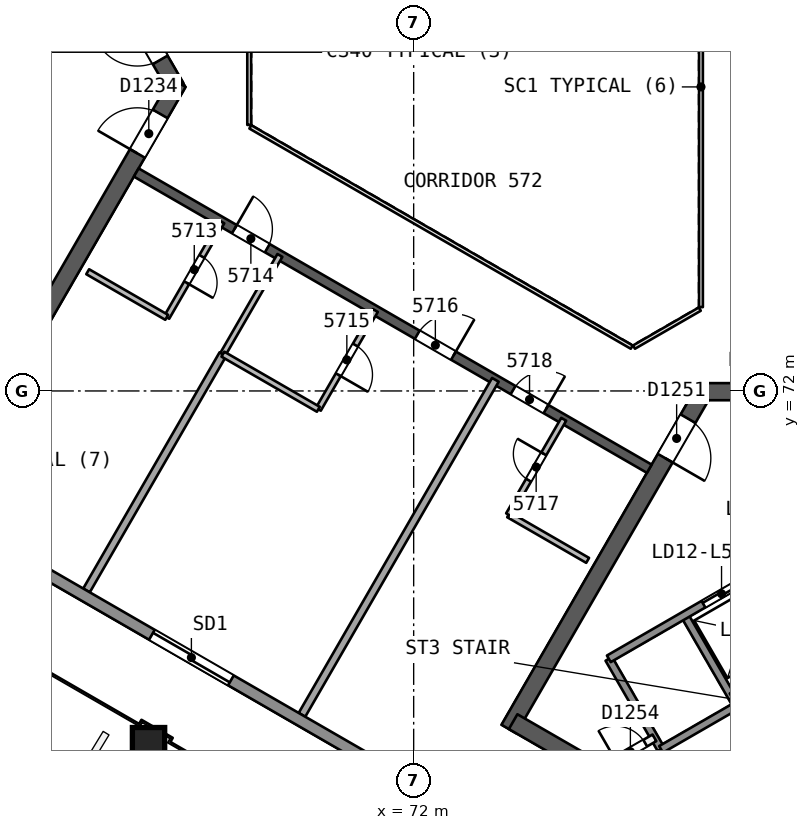
"""IFC4 building model, lengths in metres.
Left out: names, types, materials, properties, quantities, classifications, styles, units other than length and angle.
Written with IfcOpenShell. Run it as: python <this file> out.ifc"""

import sys

from ifc_helpers import new_model, si_unit, direction, frame, frame_2d, origin, origin_2d, place, context, subcontext, project, spatial, rectangle, extrude, element, fill, save


model = new_model("IFC4")
c1 = context("Model", 3, precision=1e-05, world=origin(), true_north=direction((0.0, 1.0)))
c2 = subcontext(c1, "Body", "Model", "MODEL_VIEW")
j1 = project(units=[si_unit("LENGTHUNIT", "METRE"), si_unit("PLANEANGLEUNIT", "RADIAN")], contexts=[c1])
p1 = place(None, origin())
s1 = spatial("IfcSite", under=j1, at=p1, CompositionType="ELEMENT")
p2 = place(p1, origin())
s2 = spatial("IfcBuilding", under=s1, at=p2, CompositionType="ELEMENT")
p3 = place(p2, frame((0.0, 0.0, 231.7)))
s3 = spatial("IfcBuildingStorey", under=s2, at=p3, CompositionType="ELEMENT", Elevation=231.7)
p4 = place(p3, frame((65.74, 80.0, 0.0), z_axis=(0.0, 0.0, 1.0), x_axis=(-0.499991857942, 0.866030104553, 0.0)))
e1 = element("IfcWall", 1, at=p4, inside=s3, PredefinedType="SHEAR", context=c2, shape_type="SweptSolid", body=[
    extrude(rectangle(XDim=10.25, YDim=0.45, at=frame_2d((5.125, 0.0))), origin(), (0.0, 0.0, 1.0), 3.7),
])
p5 = place(p4, frame((0.82, 0.0, 0.0)))
e2 = element("IfcOpeningElement", 2, at=p5, cuts=e1, PredefinedType="OPENING", context=c2, shape_type="SweptSolid", body=[
    extrude(rectangle(XDim=1.2, YDim=2.1, at=frame_2d((0.6, 1.05))), frame((0.0, 0.235, 0.0), z_axis=(0.0, -1.0, 0.0), x_axis=(1.0, 0.0, 0.0)), (0.0, 0.0, 1.0), 0.471),
])
p6 = place(p3, frame((60.728, 71.318, 0.0), z_axis=(0.0, 0.0, 1.0), x_axis=(0.500012416173, 0.866018235185, 0.0)))
e3 = element("IfcWall", 3, at=p6, inside=s3, PredefinedType="SHEAR", context=c2, shape_type="SweptSolid", body=[
    extrude(rectangle(XDim=10.155, YDim=0.45, at=frame_2d((5.078, 0.0))), origin(), (0.0, 0.0, 1.0), 3.7),
])
p7 = place(p6, frame((8.005, 0.0, 0.0)))
e4 = element("IfcOpeningElement", 4, at=p7, cuts=e3, PredefinedType="OPENING", context=c2, shape_type="SweptSolid", body=[
    extrude(rectangle(XDim=1.2, YDim=2.1, at=frame_2d((0.6, 1.05))), frame((0.0, 0.235, 0.0), z_axis=(0.0, -1.0, 0.0), x_axis=(1.0, 0.0, 0.0)), (0.0, 0.0, 1.0), 0.471),
])
p8 = place(p3, frame((79.63, 71.981, 0.0), z_axis=(0.0, 0.0, 1.0), x_axis=(-0.500002171595, -0.86602415001, 0.0)))
e5 = element("IfcWall", 5, at=p8, inside=s3, PredefinedType="SHEAR", context=c2, shape_type="SweptSolid", body=[
    extrude(rectangle(XDim=10.25, YDim=0.45, at=frame_2d((5.125, 0.0))), origin(), (0.0, 0.0, 1.0), 3.7),
])
p9 = place(p8, frame((0.82, 0.0, 0.0)))
e6 = element("IfcOpeningElement", 6, at=p9, cuts=e5, PredefinedType="OPENING", context=c2, shape_type="SweptSolid", body=[
    extrude(rectangle(XDim=1.2, YDim=2.1, at=frame_2d((0.6, 1.05))), frame((0.0, 0.235, 0.0), z_axis=(0.0, -1.0, 0.0), x_axis=(1.0, 0.0, 0.0)), (0.0, 0.0, 1.0), 0.471),
])
p10 = place(p3, frame((74.617, 63.299, 0.0), z_axis=(0.0, 0.0, 1.0), x_axis=(0.86602594008, -0.499999071108, 0.0)))
e7 = element("IfcWall", 7, at=p10, inside=s3, PredefinedType="SHEAR", context=c2, shape_type="SweptSolid", body=[
    extrude(rectangle(XDim=14.108, YDim=0.45, at=frame_2d((7.054, 0.0))), origin(), (0.0, 0.0, 1.0), 3.7),
])
p11 = place(p3, frame((89.655, 71.981, 0.0), z_axis=(0.0, 0.0, 1.0), x_axis=(-1.0, 0.0, 0.0)))
e8 = element("IfcWall", 8, at=p11, inside=s3, PredefinedType="SHEAR", context=c2, shape_type="SweptSolid", body=[
    extrude(rectangle(XDim=10.155, YDim=0.45, at=frame_2d((5.078, 0.0))), origin(), (0.0, 0.0, 1.0), 3.7),
])
p12 = place(p11, frame((8.005, 0.0, 0.0)))
e9 = element("IfcOpeningElement", 9, at=p12, cuts=e8, PredefinedType="OPENING", context=c2, shape_type="SweptSolid", body=[
    extrude(rectangle(XDim=1.2, YDim=2.1, at=frame_2d((0.6, 1.05))), frame((0.0, 0.235, 0.0), z_axis=(0.0, -1.0, 0.0), x_axis=(1.0, 0.0, 0.0)), (0.0, 0.0, 1.0), 0.471),
])
p13 = place(p3, frame((64.7, 77.748, 0.0), z_axis=(0.0, 0.0, 1.0), x_axis=(0.866026492143, -0.499998114903, 0.0)))
e10 = element("IfcWall", 10, at=p13, inside=s3, PredefinedType="SHEAR", context=c2, shape_type="SweptSolid", body=[
    extrude(rectangle(XDim=15.588, YDim=0.25, at=frame_2d((7.794, 0.0))), origin(), (0.0, 0.0, 1.0), 3.3),
])
p14 = place(p13, frame((2.982, 0.0, 0.0)))
e11 = element("IfcOpeningElement", 11, at=p14, cuts=e10, PredefinedType="OPENING", context=c2, shape_type="SweptSolid", body=[
    extrude(rectangle(XDim=1.0, YDim=2.1, at=frame_2d((0.5, 1.05))), frame((0.0, 0.135, 0.0), z_axis=(0.0, -1.0, 0.0), x_axis=(1.0, 0.0, 0.0)), (0.0, 0.0, 1.0), 0.271),
])
p15 = place(p13, frame((8.538, 0.0, 0.0)))
e12 = element("IfcOpeningElement", 12, at=p15, cuts=e10, PredefinedType="OPENING", context=c2, shape_type="SweptSolid", body=[
    extrude(rectangle(XDim=1.1, YDim=2.1, at=frame_2d((0.55, 1.05))), frame((0.0, 0.135, 0.0), z_axis=(0.0, -1.0, 0.0), x_axis=(1.0, 0.0, 0.0)), (0.0, 0.0, 1.0), 0.271),
])
p16 = place(p13, frame((11.45, 0.0, 0.0)))
e13 = element("IfcOpeningElement", 13, at=p16, cuts=e10, PredefinedType="OPENING", context=c2, shape_type="SweptSolid", body=[
    extrude(rectangle(XDim=1.0, YDim=2.1, at=frame_2d((0.5, 1.05))), frame((0.0, 0.135, 0.0), z_axis=(0.0, -1.0, 0.0), x_axis=(1.0, 0.0, 0.0)), (0.0, 0.0, 1.0), 0.271),
])
p17 = place(p3, frame((65.011, 62.699, 0.0), z_axis=(0.010093620709, 0.017482414954, 0.999796221231), x_axis=(-0.499912926478, -0.865840372083, 0.020187025823)))
e14 = element("IfcColumn", 14, at=p17, inside=s3, PredefinedType="COLUMN", context=c2, shape_type="SweptSolid", body=[
    extrude(rectangle(XDim=0.85, YDim=0.85, at=origin_2d()), origin(), (0.0, 0.0, 1.0), 3.701),
])
p18 = place(p3, frame((66.952, 76.448, 0.0), z_axis=(0.0, 0.0, 1.0), x_axis=(-0.499987231761, -0.866032775405, 0.0)))
e15 = element("IfcWall", 15, at=p18, inside=s3, PredefinedType="PARTITIONING", context=c2, shape_type="SweptSolid", body=[
    extrude(rectangle(XDim=2.9, YDim=0.15, at=frame_2d((1.45, 0.0))), origin(), (0.0, 0.0, 1.0), 3.3),
])
p19 = place(p18, frame((1.05, 0.0, 0.0)))
e16 = element("IfcOpeningElement", 16, at=p19, cuts=e15, PredefinedType="OPENING", context=c2, shape_type="SweptSolid", body=[
    extrude(rectangle(XDim=0.8, YDim=2.1, at=frame_2d((0.4, 1.05))), frame((0.0, 0.085, 0.0), z_axis=(0.0, -1.0, 0.0), x_axis=(1.0, 0.0, 0.0)), (0.0, 0.0, 1.0), 0.171),
])
p20 = place(p3, frame((65.502, 73.937, 0.0), z_axis=(0.0, 0.0, 1.0), x_axis=(-0.865994240961, 0.500053971709, 0.0)))
e17 = element("IfcWall", 17, at=p20, inside=s3, PredefinedType="PARTITIONING", context=c2, shape_type="SweptSolid", body=[
    extrude(rectangle(XDim=2.401, YDim=0.15, at=frame_2d((1.201, 0.0))), origin(), (0.0, 0.0, 1.0), 3.3),
])
p21 = place(p3, frame((63.391, 66.751, 0.0), z_axis=(0.0, 0.0, 1.0), x_axis=(0.499994271117, 0.866028711331, 0.0)))
e18 = element("IfcWall", 18, at=p21, inside=s3, PredefinedType="PARTITIONING", context=c2, shape_type="SweptSolid", body=[
    extrude(rectangle(XDim=7.179, YDim=0.2, at=frame_2d((3.589, 0.0))), origin(), (0.0, 0.0, 1.0), 3.3),
])
p22 = place(p3, frame((66.98, 72.968, 0.0), z_axis=(0.0, 0.0, 1.0), x_axis=(0.499990139034, 0.866031096941, 0.0)))
e19 = element("IfcWall", 19, at=p22, inside=s3, PredefinedType="PARTITIONING", context=c2, shape_type="SweptSolid", body=[
    extrude(rectangle(XDim=3.0, YDim=0.15, at=frame_2d((1.5, 0.0))), origin(), (0.0, 0.0, 1.0), 3.3),
])
p23 = place(p3, frame((70.991, 74.116, 0.0), z_axis=(0.0, 0.0, 1.0), x_axis=(-0.499990139034, -0.866031096941, 0.0)))
e20 = element("IfcWall", 20, at=p23, inside=s3, PredefinedType="PARTITIONING", context=c2, shape_type="SweptSolid", body=[
    extrude(rectangle(XDim=3.0, YDim=0.15, at=frame_2d((1.5, 0.0))), origin(), (0.0, 0.0, 1.0), 3.3),
])
p24 = place(p23, frame((1.05, 0.0, 0.0)))
e21 = element("IfcOpeningElement", 21, at=p24, cuts=e20, PredefinedType="OPENING", context=c2, shape_type="SweptSolid", body=[
    extrude(rectangle(XDim=0.9, YDim=2.1, at=frame_2d((0.45, 1.05))), frame((0.0, 0.085, 0.0), z_axis=(0.0, -1.0, 0.0), x_axis=(1.0, 0.0, 0.0)), (0.0, 0.0, 1.0), 0.171),
])
p25 = place(p3, frame((69.491, 71.518, 0.0), z_axis=(0.0, 0.0, 1.0), x_axis=(-0.866032775405, 0.499987231761, 0.0)))
e22 = element("IfcWall", 22, at=p25, inside=s3, PredefinedType="PARTITIONING", context=c2, shape_type="SweptSolid", body=[
    extrude(rectangle(XDim=2.9, YDim=0.15, at=frame_2d((1.45, 0.0))), origin(), (0.0, 0.0, 1.0), 3.3),
])
p26 = place(p3, frame((69.061, 63.477, 0.0), z_axis=(0.0, 0.0, 1.0), x_axis=(0.499993053251, 0.866029414455, 0.0)))
e23 = element("IfcWall", 23, at=p26, inside=s3, PredefinedType="PARTITIONING", context=c2, shape_type="SweptSolid", body=[
    extrude(rectangle(XDim=10.179, YDim=0.2, at=frame_2d((5.089, 0.0))), origin(), (0.0, 0.0, 1.0), 3.3),
])
p27 = place(p3, frame((76.578, 67.542, 0.0), z_axis=(0.0, 0.0, 1.0), x_axis=(-0.866038271014, 0.499977712642, 0.0)))
e24 = element("IfcWall", 24, at=p27, inside=s3, PredefinedType="PARTITIONING", context=c2, shape_type="SweptSolid", body=[
    extrude(rectangle(XDim=2.401, YDim=0.15, at=frame_2d((1.2, 0.0))), origin(), (0.0, 0.0, 1.0), 3.3),
])
p28 = place(p3, frame((74.498, 68.743, 0.0), z_axis=(0.0, 0.0, 1.0), x_axis=(0.499987231761, 0.866032775405, 0.0)))
e25 = element("IfcWall", 25, at=p28, inside=s3, PredefinedType="PARTITIONING", context=c2, shape_type="SweptSolid", body=[
    extrude(rectangle(XDim=2.9, YDim=0.15, at=frame_2d((1.45, 0.0))), origin(), (0.0, 0.0, 1.0), 3.3),
])
p29 = place(p28, frame((1.05, 0.0, 0.0)))
e26 = element("IfcOpeningElement", 26, at=p29, cuts=e25, PredefinedType="OPENING", context=c2, shape_type="SweptSolid", body=[
    extrude(rectangle(XDim=0.8, YDim=2.1, at=frame_2d((0.4, 1.05))), frame((0.0, 0.085, 0.0), z_axis=(0.0, -1.0, 0.0), x_axis=(1.0, 0.0, 0.0)), (0.0, 0.0, 1.0), 0.171),
])
p30 = place(p3, frame((87.988, 52.377, 0.0), z_axis=(0.0, 0.0, 1.0), x_axis=(-0.866023992326, 0.500002444709, 0.0)))
e27 = element("IfcWall", 27, at=p30, inside=s3, PredefinedType="SOLIDWALL", context=c2, shape_type="SweptSolid", body=[
    extrude(rectangle(XDim=50.118, YDim=0.3, at=frame_2d((25.059, 0.0))), origin(), (0.0, 0.0, 1.0), 3.3),
])
p31 = place(p30, frame((24.015, 0.0, 0.0)))
e28 = element("IfcOpeningElement", 28, at=p31, cuts=e27, PredefinedType="OPENING", context=c2, shape_type="SweptSolid", body=[
    extrude(rectangle(XDim=2.4, YDim=2.4, at=frame_2d((1.2, 1.2))), frame((0.0, 0.161, 0.0), z_axis=(0.0, -1.0, 0.0), x_axis=(1.0, 0.0, 0.0)), (0.0, 0.0, 1.0), 0.321),
])
p32 = place(p30, frame((38.146, 0.0, 0.0)))
e29 = element("IfcOpeningElement", 29, at=p32, cuts=e27, PredefinedType="OPENING", context=c2, shape_type="SweptSolid", body=[
    extrude(rectangle(XDim=2.4, YDim=2.4, at=frame_2d((1.2, 1.2))), frame((0.0, 0.161, 0.0), z_axis=(0.0, -1.0, 0.0), x_axis=(1.0, 0.0, 0.0)), (0.0, 0.0, 1.0), 0.321),
])
p33 = place(p30, frame((9.727, 0.0, 0.0)))
e30 = element("IfcOpeningElement", 30, at=p33, cuts=e27, PredefinedType="OPENING", context=c2, shape_type="SweptSolid", body=[
    extrude(rectangle(XDim=2.4, YDim=2.4, at=frame_2d((1.2, 1.2))), frame((0.0, 0.161, 0.0), z_axis=(0.0, -1.0, 0.0), x_axis=(1.0, 0.0, 0.0)), (0.0, 0.0, 1.0), 0.321),
])
for number, where, z_axis, x_axis in (
    (31, (77.135, 64.952, 0.0), (0.0, 0.0, 1.0), (0.5, -0.866, 0.0)),
    (32, (79.127, 66.102, 0.0), (0.0, 0.0, 1.0), (0.5, -0.866, 0.0)),
):
    element("IfcWall", number, at=place(p3, frame(where, z_axis=z_axis, x_axis=x_axis)), inside=s3, PredefinedType="SOLIDWALL", context=c2, shape_type="SweptSolid", body=[
        extrude(rectangle(XDim=2.75, YDim=0.2, at=frame_2d((1.375, 0.0))), origin(), (0.0, 0.0, 1.0), 3.3),
    ])
p34 = place(p3, frame((77.135, 64.952, 0.0), z_axis=(0.0, 0.0, 1.0), x_axis=(0.866031916153, 0.499988720078, 0.0)))
e33 = element("IfcWall", 33, at=p34, inside=s3, PredefinedType="SOLIDWALL", context=c2, shape_type="SweptSolid", body=[
    extrude(rectangle(XDim=11.35, YDim=0.2, at=frame_2d((5.675, 0.0))), origin(), (0.0, 0.0, 1.0), 3.3),
])
p35 = place(p34, frame((2.875, 0.0, 0.0)))
e34 = element("IfcOpeningElement", 34, at=p35, cuts=e33, PredefinedType="OPENING", context=c2, shape_type="SweptSolid", body=[
    extrude(rectangle(XDim=1.1, YDim=2.1, at=frame_2d((0.55, 1.05))), frame((0.0, 0.11, 0.0), z_axis=(0.0, -1.0, 0.0), x_axis=(1.0, 0.0, 0.0)), (0.0, 0.0, 1.0), 0.221),
])
p36 = place(p34, frame((5.125, 0.0, 0.0)))
e35 = element("IfcOpeningElement", 35, at=p36, cuts=e33, PredefinedType="OPENING", context=c2, shape_type="SweptSolid", body=[
    extrude(rectangle(XDim=1.1, YDim=2.1, at=frame_2d((0.55, 1.05))), frame((0.0, 0.11, 0.0), z_axis=(0.0, -1.0, 0.0), x_axis=(1.0, 0.0, 0.0)), (0.0, 0.0, 1.0), 0.221),
])
p37 = place(p34, frame((7.375, 0.0, 0.0)))
e36 = element("IfcOpeningElement", 36, at=p37, cuts=e33, PredefinedType="OPENING", context=c2, shape_type="SweptSolid", body=[
    extrude(rectangle(XDim=1.1, YDim=2.1, at=frame_2d((0.55, 1.05))), frame((0.0, 0.11, 0.0), z_axis=(0.0, -1.0, 0.0), x_axis=(1.0, 0.0, 0.0)), (0.0, 0.0, 1.0), 0.221),
])
p38 = place(p3, frame((77.07, 62.143, 0.0), z_axis=(0.0, 0.0, 1.0), x_axis=(0.866013036001, 0.500021421018, 0.0)))
e37 = element("IfcWall", 37, at=p38, inside=s3, PredefinedType="PARTITIONING", context=c2, shape_type="SweptSolid", body=[
    extrude(rectangle(XDim=1.461, YDim=0.2, at=frame_2d((0.73, 0.0))), origin(), (0.0, 0.0, 1.0), 3.3),
])
p39 = place(p38, frame((0.281, 0.0, 0.0)))
e38 = element("IfcOpeningElement", 38, at=p39, cuts=e37, PredefinedType="OPENING", context=c2, shape_type="SweptSolid", body=[
    extrude(rectangle(XDim=0.9, YDim=2.1, at=frame_2d((0.45, 1.05))), frame((0.0, 0.11, 0.0), z_axis=(0.0, -1.0, 0.0), x_axis=(1.0, 0.0, 0.0)), (0.0, 0.0, 1.0), 0.221),
])
p40 = place(p3, frame((80.367, 63.954, 0.0), z_axis=(0.0, 0.0, 1.0), x_axis=(0.866026575979, 0.499997969693, 0.0)))
e39 = element("IfcWall", 39, at=p40, inside=s3, PredefinedType="SOLIDWALL", context=c2, shape_type="SweptSolid", body=[
    extrude(rectangle(XDim=6.75, YDim=0.2, at=frame_2d((3.375, 0.0))), origin(), (0.0, 0.0, 1.0), 3.3),
])
p41 = place(p3, frame((78.51, 62.57, 0.0), z_axis=(0.0, 0.0, 1.0), x_axis=(0.866053019151, 0.499952165731, 0.0)))
e40 = element("IfcWall", 40, at=p41, inside=s3, PredefinedType="SOLIDWALL", context=c2, shape_type="SweptSolid", body=[
    extrude(rectangle(XDim=2.3, YDim=0.2, at=frame_2d((1.15, 0.0))), origin(), (0.0, 0.0, 1.0), 3.3),
])
p42 = place(p3, frame((79.56, 74.206, 0.0), z_axis=(0.0, 0.0, 1.0), x_axis=(0.0, 1.0, 0.0)))
e41 = element("IfcWall", 41, at=p42, inside=s3, PredefinedType="PARTITIONING", context=c2, shape_type="SweptSolid", body=[
    extrude(rectangle(XDim=11.588, YDim=0.1, at=frame_2d((5.794, 0.0))), origin(), (0.0, 0.0, 1.0), 3.3),
])
p43 = place(p3, frame((67.672, 81.0, 0.0), z_axis=(0.0, 0.0, 1.0), x_axis=(0.0, -1.0, 0.0)))
e42 = element("IfcWall", 42, at=p43, inside=s3, PredefinedType="PARTITIONING", context=c2, shape_type="SweptSolid", body=[
    extrude(rectangle(XDim=2.0, YDim=0.1, at=frame_2d((1.0, 0.0))), origin(), (0.0, 0.0, 1.0), 3.3),
])
p44 = place(p3, frame((67.702, 78.948, 0.0), z_axis=(0.0, 0.0, 1.0), x_axis=(0.866026658274, -0.499997827154, 0.0)))
e43 = element("IfcWall", 43, at=p44, inside=s3, PredefinedType="PARTITIONING", context=c2, shape_type="SweptSolid", body=[
    extrude(rectangle(XDim=11.588, YDim=0.1, at=frame_2d((5.794, 0.0))), origin(), (0.0, 0.0, 1.0), 3.3),
])
p45 = place(p3, frame((77.798, 73.154, 0.0), z_axis=(0.0, 0.0, 1.0), x_axis=(0.866041268327, 0.499972520799, 0.0)))
e44 = element("IfcWall", 44, at=p45, inside=s3, PredefinedType="PARTITIONING", context=c2, shape_type="SweptSolid", body=[
    extrude(rectangle(XDim=2.0, YDim=0.1, at=frame_2d((1.0, 0.0))), origin(), (0.0, 0.0, 1.0), 3.3),
])
p46 = place(p19, origin())
e45 = element("IfcDoor", 45, at=p46, inside=s3, OperationType="SINGLE_SWING_RIGHT", PredefinedType="NOTDEFINED", context=c2, shape_type="SweptSolid", body=[
    extrude(rectangle(XDim=0.8, YDim=2.1, at=frame_2d((0.4, 1.05))), frame((0.0, 0.025, 0.0), z_axis=(0.0, -1.0, 0.0), x_axis=(1.0, 0.0, 0.0)), (0.0, 0.0, 1.0), 0.05),
])
fill(e16, e45)
p47 = place(p14, origin())
e46 = element("IfcDoor", 46, at=p47, inside=s3, OperationType="SINGLE_SWING_LEFT", PredefinedType="NOTDEFINED", context=c2, shape_type="SweptSolid", body=[
    extrude(rectangle(XDim=1.0, YDim=2.1, at=frame_2d((0.5, 1.05))), frame((0.0, 0.025, 0.0), z_axis=(0.0, -1.0, 0.0), x_axis=(1.0, 0.0, 0.0)), (0.0, 0.0, 1.0), 0.05),
])
fill(e11, e46)
p48 = place(p24, origin())
e47 = element("IfcDoor", 47, at=p48, inside=s3, OperationType="SINGLE_SWING_RIGHT", PredefinedType="NOTDEFINED", context=c2, shape_type="SweptSolid", body=[
    extrude(rectangle(XDim=0.9, YDim=2.1, at=frame_2d((0.45, 1.05))), frame((0.0, 0.025, 0.0), z_axis=(0.0, -1.0, 0.0), x_axis=(1.0, 0.0, 0.0)), (0.0, 0.0, 1.0), 0.05),
])
fill(e21, e47)
p49 = place(p15, origin())
e48 = element("IfcDoor", 48, at=p49, inside=s3, OperationType="SINGLE_SWING_RIGHT", PredefinedType="NOTDEFINED", context=c2, shape_type="SweptSolid", body=[
    extrude(rectangle(XDim=1.1, YDim=2.1, at=frame_2d((0.55, 1.05))), frame((0.0, 0.025, 0.0), z_axis=(0.0, -1.0, 0.0), x_axis=(1.0, 0.0, 0.0)), (0.0, 0.0, 1.0), 0.05),
])
fill(e12, e48)
p50 = place(p29, origin())
e49 = element("IfcDoor", 49, at=p50, inside=s3, OperationType="SINGLE_SWING_RIGHT", PredefinedType="NOTDEFINED", context=c2, shape_type="SweptSolid", body=[
    extrude(rectangle(XDim=0.8, YDim=2.1, at=frame_2d((0.4, 1.05))), frame((0.0, 0.025, 0.0), z_axis=(0.0, -1.0, 0.0), x_axis=(1.0, 0.0, 0.0)), (0.0, 0.0, 1.0), 0.05),
])
fill(e26, e49)
p51 = place(p16, origin())
e50 = element("IfcDoor", 50, at=p51, inside=s3, OperationType="SINGLE_SWING_RIGHT", PredefinedType="NOTDEFINED", context=c2, shape_type="SweptSolid", body=[
    extrude(rectangle(XDim=1.0, YDim=2.1, at=frame_2d((0.5, 1.05))), frame((0.0, 0.025, 0.0), z_axis=(0.0, -1.0, 0.0), x_axis=(1.0, 0.0, 0.0)), (0.0, 0.0, 1.0), 0.05),
])
fill(e13, e50)
p52 = place(p31, origin())
e51 = element("IfcDoor", 51, at=p52, inside=s3, OperationType="SLIDING_TO_LEFT", PredefinedType="NOTDEFINED", context=c2, shape_type="SweptSolid", body=[
    extrude(rectangle(XDim=2.4, YDim=2.4, at=frame_2d((1.2, 1.2))), frame((0.0, 0.025, 0.0), z_axis=(0.0, -1.0, 0.0), x_axis=(1.0, 0.0, 0.0)), (0.0, 0.0, 1.0), 0.05),
])
fill(e28, e51)
p53 = place(p5, origin())
e52 = element("IfcDoor", 52, at=p53, inside=s3, OperationType="SINGLE_SWING_RIGHT", PredefinedType="NOTDEFINED", context=c2, shape_type="SweptSolid", body=[
    extrude(rectangle(XDim=1.2, YDim=2.1, at=frame_2d((0.6, 1.05))), frame((0.0, 0.025, 0.0), z_axis=(0.0, -1.0, 0.0), x_axis=(1.0, 0.0, 0.0)), (0.0, 0.0, 1.0), 0.05),
])
fill(e2, e52)
p54 = place(p7, origin())
e53 = element("IfcDoor", 53, at=p54, inside=s3, OperationType="SINGLE_SWING_LEFT", PredefinedType="NOTDEFINED", context=c2, shape_type="SweptSolid", body=[
    extrude(rectangle(XDim=1.2, YDim=2.1, at=frame_2d((0.6, 1.05))), frame((0.0, 0.025, 0.0), z_axis=(0.0, -1.0, 0.0), x_axis=(1.0, 0.0, 0.0)), (0.0, 0.0, 1.0), 0.05),
])
fill(e4, e53)
p55 = place(p9, origin())
e54 = element("IfcDoor", 54, at=p55, inside=s3, OperationType="SINGLE_SWING_RIGHT", PredefinedType="NOTDEFINED", context=c2, shape_type="SweptSolid", body=[
    extrude(rectangle(XDim=1.2, YDim=2.1, at=frame_2d((0.6, 1.05))), frame((0.0, 0.025, 0.0), z_axis=(0.0, -1.0, 0.0), x_axis=(1.0, 0.0, 0.0)), (0.0, 0.0, 1.0), 0.05),
])
fill(e6, e54)
p56 = place(p35, origin())
e55 = element("IfcDoor", 55, at=p56, inside=s3, OperationType="SLIDING_TO_LEFT", PredefinedType="NOTDEFINED", context=c2, shape_type="SweptSolid", body=[
    extrude(rectangle(XDim=1.1, YDim=2.1, at=frame_2d((0.55, 1.05))), frame((0.0, 0.025, 0.0), z_axis=(0.0, -1.0, 0.0), x_axis=(1.0, 0.0, 0.0)), (0.0, 0.0, 1.0), 0.05),
])
fill(e34, e55)
p57 = place(p39, origin())
e56 = element("IfcDoor", 56, at=p57, inside=s3, OperationType="SINGLE_SWING_LEFT", PredefinedType="NOTDEFINED", context=c2, shape_type="SweptSolid", body=[
    extrude(rectangle(XDim=0.9, YDim=2.1, at=frame_2d((0.45, 1.05))), frame((0.0, 0.025, 0.0), z_axis=(0.0, -1.0, 0.0), x_axis=(1.0, 0.0, 0.0)), (0.0, 0.0, 1.0), 0.05),
])
fill(e38, e56)
save(model, sys.argv[1])
